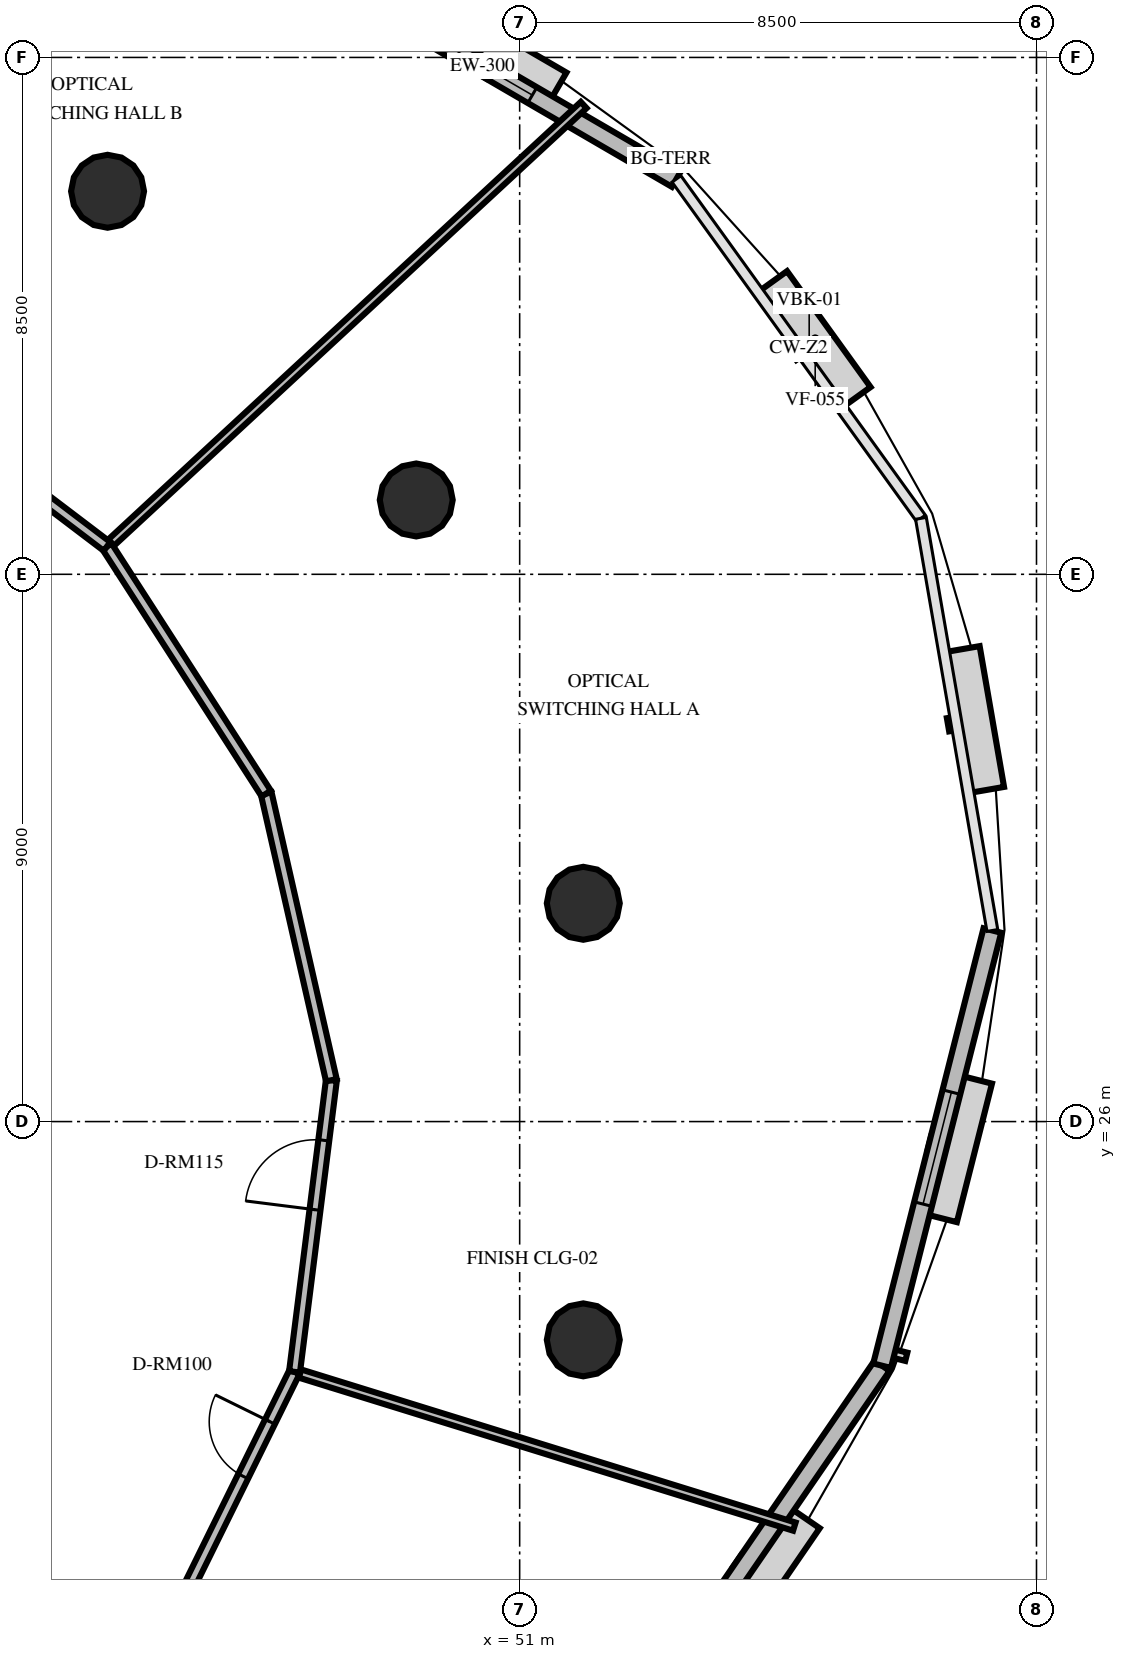
"""IFC4 building model, lengths in metres.
Left out: names, types, materials, properties, quantities, classifications, styles, units other than length and angle.
Written with IfcOpenShell. Run it as: python <this file> out.ifc"""

import sys

from ifc_helpers import new_model, si_unit, direction, frame, frame_2d, origin, origin_2d, place, context, subcontext, project, spatial, rectangle, circle, extrude, element, fill, save


model = new_model("IFC4")
c1 = context("Model", 3, precision=1e-05, world=origin(), true_north=direction((0.0, 1.0)))
c2 = subcontext(c1, "Body", "Model", "MODEL_VIEW")
j1 = project(units=[si_unit("LENGTHUNIT", "METRE"), si_unit("PLANEANGLEUNIT", "RADIAN")], contexts=[c1])
p1 = place(None, origin())
s1 = spatial("IfcSite", under=j1, at=p1, CompositionType="ELEMENT")
p2 = place(p1, origin())
s2 = spatial("IfcBuilding", under=s1, at=p2, CompositionType="ELEMENT")
p3 = place(p2, frame((0.0, 0.0, 129.8)))
s3 = spatial("IfcBuildingStorey", under=s2, at=p3, CompositionType="ELEMENT", Elevation=129.8)
for number, where, z_axis, x_axis in (
    (1, (52.046, 29.59, 0.0), (0.0, 0.0, 1.0), (1.0, 0.0, 0.0)),
    (2, (49.299, 36.222, 0.0), (0.0, 0.0, 1.0), (1.0, 0.0, 0.0)),
    (3, (44.222, 41.299, 0.0), (0.0, 0.0, 1.0), (1.0, 0.0, 0.0)),
    (4, (52.046, 22.41, 0.0), (0.0, 0.0, 1.0), (1.0, 0.0, 0.0)),
):
    element("IfcColumn", number, at=place(p3, frame(where, z_axis=z_axis, x_axis=x_axis)), inside=s3, PredefinedType="COLUMN", context=c2, shape_type="SweptSolid", body=[
        extrude(circle(Radius=0.6, at=origin_2d()), origin(), (0.0, 0.0, 1.0), 4.0),
    ])
p4 = place(p3, frame((53.579, 41.502, 0.0), z_axis=(0.0, 0.0, 1.0), x_axis=(-0.864447367907, 0.502723331585, 0.0)))
e5 = element("IfcWall", 5, at=p4, inside=s3, PredefinedType="SOLIDWALL", context=c2, shape_type="SweptSolid", body=[
    extrude(rectangle(XDim=7.383, YDim=0.3, at=frame_2d((3.691, 0.0))), origin(), (0.0, 0.0, 1.0), 2.9),
])
p5 = place(p4, frame((2.742, 0.0, 0.8)))
e6 = element("IfcOpeningElement", 6, at=p5, cuts=e5, PredefinedType="OPENING", context=c2, shape_type="SweptSolid", body=[
    extrude(rectangle(XDim=1.9, YDim=1.95, at=frame_2d((0.95, 0.975))), frame((0.0, 0.16, 0.0), z_axis=(0.0, -1.0, 0.0), x_axis=(1.0, 0.0, 0.0)), (0.0, 0.0, 1.0), 0.32),
])
p6 = place(p3, frame((52.378, 15.312, 0.0), z_axis=(0.0, 0.0, 1.0), x_axis=(0.566158848857, 0.824296159072, 0.0)))
e7 = element("IfcWall", 7, at=p6, inside=s3, PredefinedType="SOLIDWALL", context=c2, shape_type="SweptSolid", body=[
    extrude(rectangle(XDim=8.095, YDim=0.3, at=frame_2d((4.047, 0.0))), origin(), (0.0, 0.0, 1.0), 2.9),
])
p7 = place(p6, frame((1.615, 0.0, 0.8)))
e8 = element("IfcOpeningElement", 8, at=p7, cuts=e7, PredefinedType="OPENING", context=c2, shape_type="SweptSolid", body=[
    extrude(rectangle(XDim=1.9, YDim=1.95, at=frame_2d((0.95, 0.975))), frame((0.0, 0.16, 0.0), z_axis=(0.0, -1.0, 0.0), x_axis=(1.0, 0.0, 0.0)), (0.0, 0.0, 1.0), 0.32),
])
p8 = place(p3, frame((56.961, 21.985, 0.0), z_axis=(0.0, 0.0, 1.0), x_axis=(0.245615389449, 0.969367360945, 0.0)))
e9 = element("IfcWall", 9, at=p8, inside=s3, PredefinedType="SOLIDWALL", context=c2, shape_type="SweptSolid", body=[
    extrude(rectangle(XDim=7.383, YDim=0.3, at=frame_2d((3.692, 0.0))), origin(), (0.0, 0.0, 1.0), 2.9),
])
p9 = place(p8, frame((2.742, 0.0, 0.8)))
e10 = element("IfcOpeningElement", 10, at=p9, cuts=e9, PredefinedType="OPENING", context=c2, shape_type="SweptSolid", body=[
    extrude(rectangle(XDim=1.9, YDim=1.95, at=frame_2d((0.95, 0.975))), frame((0.0, 0.16, 0.0), z_axis=(0.0, -1.0, 0.0), x_axis=(1.0, 0.0, 0.0)), (0.0, 0.0, 1.0), 0.32),
])
p10 = place(p3, frame((47.298, 21.884, 0.0), z_axis=(0.0, 0.0, 1.0), x_axis=(0.955272723626, -0.295726264467, 0.0)))
e11 = element("IfcWall", 11, at=p10, inside=s3, PredefinedType="PARTITIONING", context=c2, shape_type="SweptSolid", body=[
    extrude(rectangle(XDim=8.605, YDim=0.14, at=frame_2d((4.302, 0.0))), origin(), (0.0, 0.0, 1.0), 2.8),
])
p11 = place(p3, frame((45.375, 17.976, 0.0), z_axis=(0.0, 0.0, 1.0), x_axis=(0.441509083926, 0.897256779752, 0.0)))
e12 = element("IfcWall", 12, at=p11, inside=s3, PredefinedType="PARTITIONING", context=c2, shape_type="SweptSolid", body=[
    extrude(rectangle(XDim=4.355, YDim=0.18, at=frame_2d((2.178, 0.0))), origin(), (0.0, 0.0, 1.0), 2.8),
])
p12 = place(p11, frame((2.441, 0.0, 0.0)))
e13 = element("IfcOpeningElement", 13, at=p12, cuts=e12, PredefinedType="OPENING", context=c2, shape_type="SweptSolid", body=[
    extrude(rectangle(XDim=1.0, YDim=2.15, at=frame_2d((0.5, 1.075))), frame((0.0, 0.1, 0.0), z_axis=(0.0, -1.0, 0.0), x_axis=(1.0, 0.0, 0.0)), (0.0, 0.0, 1.0), 0.2),
])
p13 = place(p3, frame((44.213, 35.458, 0.0), z_axis=(0.0, 0.0, 1.0), x_axis=(0.733742531986, 0.679427624368, 0.0)))
e14 = element("IfcWall", 14, at=p13, inside=s3, PredefinedType="PARTITIONING", context=c2, shape_type="SweptSolid", body=[
    extrude(rectangle(XDim=10.684, YDim=0.14, at=frame_2d((5.342, 0.0))), origin(), (0.0, 0.0, 1.0), 2.8),
])
p14 = place(p3, frame((47.298, 21.884, 0.0), z_axis=(0.0, 0.0, 1.0), x_axis=(0.125296416972, 0.992119351638, 0.0)))
e15 = element("IfcWall", 15, at=p14, inside=s3, PredefinedType="PARTITIONING", context=c2, shape_type="SweptSolid", body=[
    extrude(rectangle(XDim=4.834, YDim=0.18, at=frame_2d((2.417, 0.0))), origin(), (0.0, 0.0, 1.0), 2.8),
])
p15 = place(p14, frame((2.688, 0.0, 0.0)))
e16 = element("IfcOpeningElement", 16, at=p15, cuts=e15, PredefinedType="OPENING", context=c2, shape_type="SweptSolid", body=[
    extrude(rectangle(XDim=1.15, YDim=2.15, at=frame_2d((0.575, 1.075))), frame((0.0, 0.1, 0.0), z_axis=(0.0, -1.0, 0.0), x_axis=(1.0, 0.0, 0.0)), (0.0, 0.0, 1.0), 0.2),
])
p16 = place(p3, frame((47.903, 26.68, 0.0), z_axis=(0.0, 0.0, 1.0), x_axis=(-0.221542525612, 0.975150711093, 0.0)))
e17 = element("IfcWall", 17, at=p16, inside=s3, PredefinedType="PARTITIONING", context=c2, shape_type="SweptSolid", body=[
    extrude(rectangle(XDim=4.834, YDim=0.18, at=frame_2d((2.417, 0.0))), origin(), (0.0, 0.0, 1.0), 2.8),
])
for number, where, z_axis, x_axis in (
    (18, (46.832, 31.394, 0.0), (0.0, 0.0, 1.0), (-0.542, 0.841, 0.0)),
    (19, (44.213, 35.458, 0.0), (0.0, 0.0, 1.0), (-0.797, 0.605, 0.0)),
):
    element("IfcWall", number, at=place(p3, frame(where, z_axis=z_axis, x_axis=x_axis)), inside=s3, PredefinedType="PARTITIONING", context=c2, shape_type="SweptSolid", body=[
        extrude(rectangle(XDim=4.834, YDim=0.18, at=frame_2d((2.417, 0.0))), origin(), (0.0, 0.0, 1.0), 2.8),
    ])
p17 = place(p5, origin())
e20 = element("IfcWindow", 20, at=p17, inside=s3, PartitioningType="SINGLE_PANEL", PredefinedType="WINDOW", context=c2, shape_type="SweptSolid", body=[
    extrude(rectangle(XDim=1.9, YDim=1.95, at=frame_2d((0.95, 0.975))), frame((0.0, 0.03, 0.0), z_axis=(0.0, -1.0, 0.0), x_axis=(1.0, 0.0, 0.0)), (0.0, 0.0, 1.0), 0.06),
])
fill(e6, e20)
p18 = place(p9, origin())
e21 = element("IfcWindow", 21, at=p18, inside=s3, PartitioningType="SINGLE_PANEL", PredefinedType="WINDOW", context=c2, shape_type="SweptSolid", body=[
    extrude(rectangle(XDim=1.9, YDim=1.95, at=frame_2d((0.95, 0.975))), frame((0.0, 0.03, 0.0), z_axis=(0.0, -1.0, 0.0), x_axis=(1.0, 0.0, 0.0)), (0.0, 0.0, 1.0), 0.06),
])
fill(e10, e21)
p19 = place(p12, origin())
e22 = element("IfcDoor", 22, at=p19, inside=s3, OperationType="SINGLE_SWING_RIGHT", PredefinedType="DOOR", context=c2, shape_type="SweptSolid", body=[
    extrude(rectangle(XDim=1.0, YDim=2.15, at=frame_2d((0.5, 1.075))), frame((0.0, 0.025, 0.0), z_axis=(0.0, -1.0, 0.0), x_axis=(1.0, 0.0, 0.0)), (0.0, 0.0, 1.0), 0.05),
])
fill(e13, e22)
p20 = place(p15, origin())
e23 = element("IfcDoor", 23, at=p20, inside=s3, OperationType="SINGLE_SWING_LEFT", PredefinedType="DOOR", context=c2, shape_type="SweptSolid", body=[
    extrude(rectangle(XDim=1.15, YDim=2.15, at=frame_2d((0.575, 1.075))), frame((0.0, 0.025, 0.0), z_axis=(0.0, -1.0, 0.0), x_axis=(1.0, 0.0, 0.0)), (0.0, 0.0, 1.0), 0.05),
])
fill(e16, e23)
save(model, sys.argv[1])
